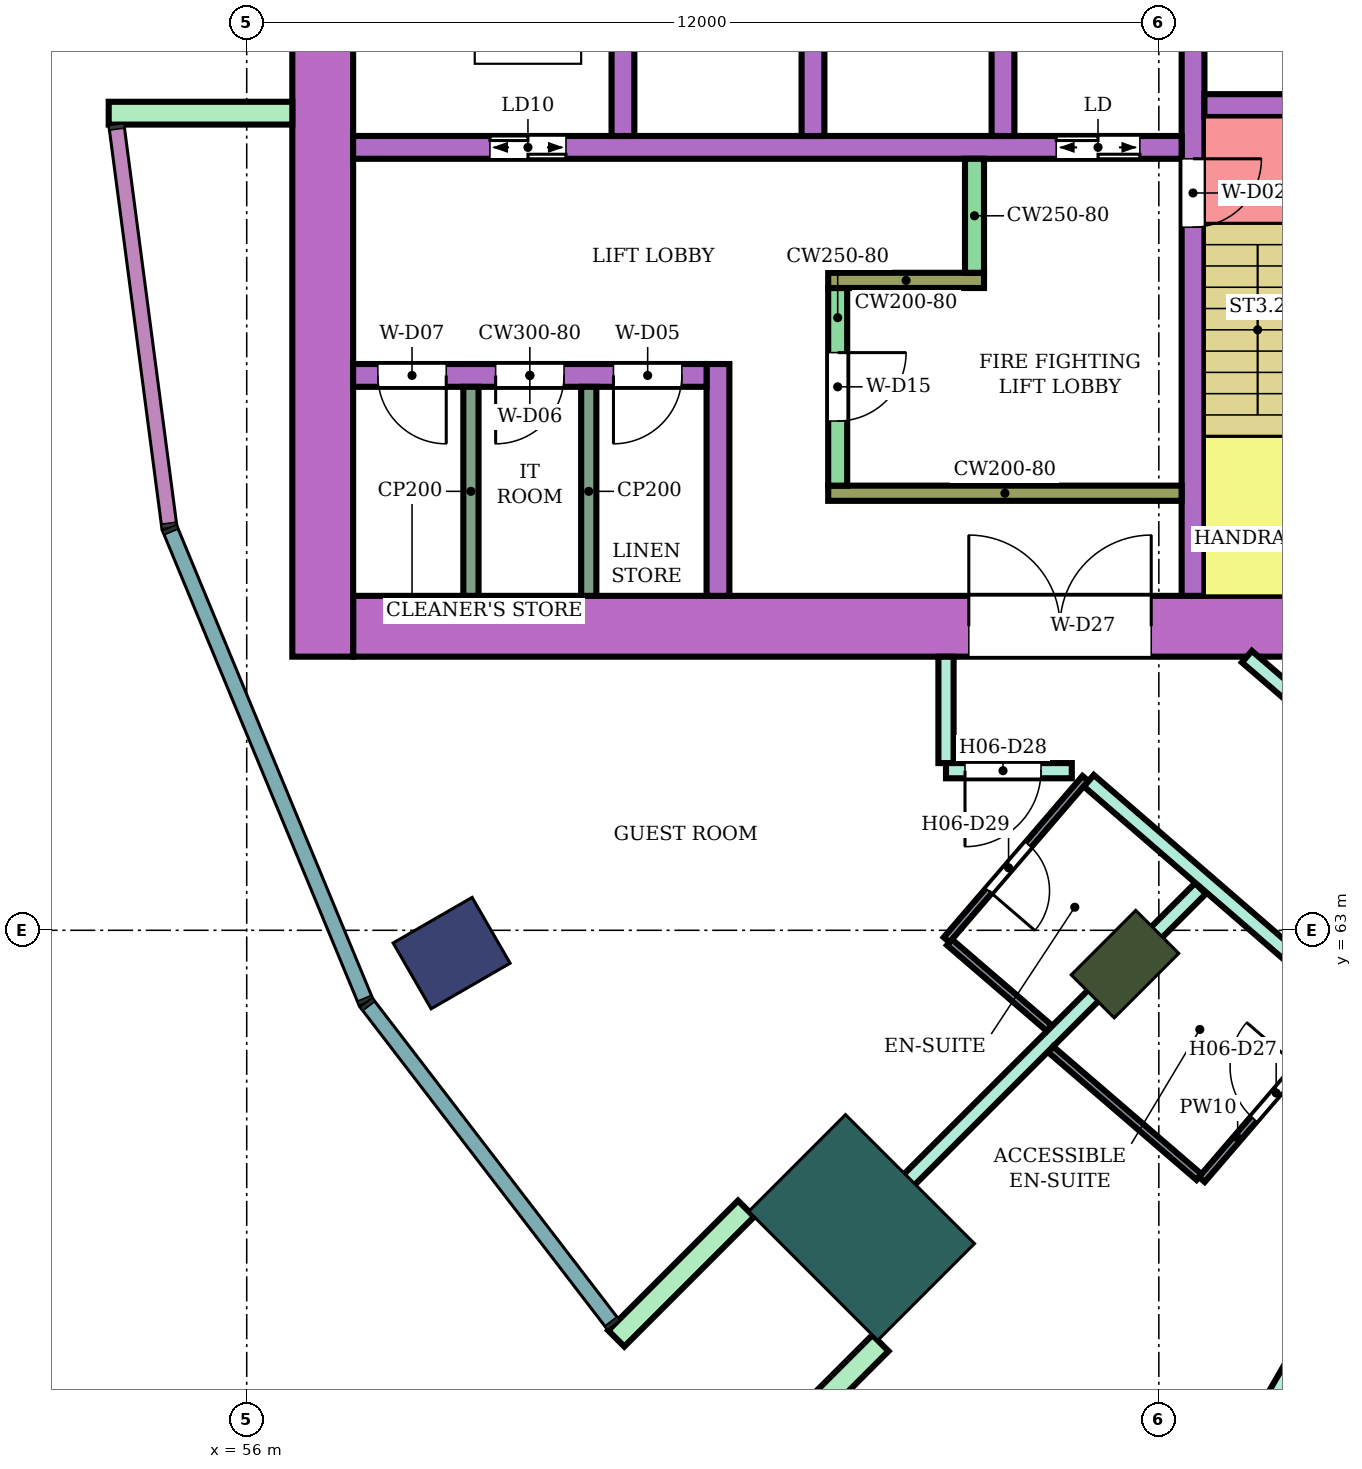
"""IFC4 building model, lengths in metres.
Left out: names, types, materials, properties, quantities, classifications, styles, units other than length and angle.
Written with IfcOpenShell. Run it as: python <this file> out.ifc"""

import sys

from ifc_helpers import new_model, si_unit, direction, frame, frame_2d, origin, origin_2d, place, context, subcontext, project, spatial, rectangle, extrude, element, fill, save


model = new_model("IFC4")
c1 = context("Model", 3, precision=1e-05, world=origin(), true_north=direction((0.0, 1.0)))
c2 = subcontext(c1, "Body", "Model", "MODEL_VIEW")
j1 = project(units=[si_unit("LENGTHUNIT", "METRE"), si_unit("PLANEANGLEUNIT", "RADIAN")], contexts=[c1])
p1 = place(None, origin())
s1 = spatial("IfcSite", under=j1, at=p1, CompositionType="ELEMENT")
p2 = place(p1, origin())
s2 = spatial("IfcBuilding", under=s1, at=p2, CompositionType="ELEMENT")
p3 = place(p2, frame((0.0, 0.0, 97.6)))
s3 = spatial("IfcBuildingStorey", under=s2, at=p3, CompositionType="ELEMENT", Elevation=97.6)
p4 = place(p3, frame((58.696, 62.7, 0.0), z_axis=(0.0, 0.0, 1.0), x_axis=(-0.866025403784, -0.5, 0.0)))
e1 = element("IfcColumn", 1, at=p4, inside=s3, PredefinedType="COLUMN", context=c2, shape_type="SweptSolid", body=[
    extrude(rectangle(XDim=1.2, YDim=1.0, at=origin_2d()), origin(), (0.0, 0.0, 1.0), 3.8),
])
p5 = place(p3, frame((67.555, 62.555, 0.0), z_axis=(0.0, 0.0, 1.0), x_axis=(-0.707106781187, -0.707106781187, 0.0)))
e2 = element("IfcColumn", 2, at=p5, inside=s3, PredefinedType="COLUMN", context=c2, shape_type="SweptSolid", body=[
    extrude(rectangle(XDim=1.2, YDim=0.8, at=origin_2d()), origin(), (0.0, 0.0, 1.0), 3.8),
])
p6 = place(p3, frame((64.09, 59.09, 0.0), z_axis=(0.0, 0.0, 1.0), x_axis=(-0.707106781187, -0.707106781187, 0.0)))
e3 = element("IfcColumn", 3, at=p6, inside=s3, PredefinedType="COLUMN", context=c2, shape_type="SweptSolid", body=[
    extrude(rectangle(XDim=1.8, YDim=2.4, at=origin_2d()), origin(), (0.0, 0.0, 1.0), 3.8),
])
p7 = place(p3, frame((72.1, 67.0, 0.0), z_axis=(0.0, 0.0, 1.0), x_axis=(-1.0, 0.0, 0.0)))
e4 = element("IfcWall", 4, at=p7, inside=s3, PredefinedType="SHEAR", context=c2, shape_type="SweptSolid", body=[
    extrude(rectangle(XDim=14.7, YDim=0.8, at=frame_2d((7.35, 0.0))), origin(), (0.0, 0.0, 1.0), 3.48),
])
p8 = place(p7, frame((4.2, 0.0, 0.0)))
e5 = element("IfcOpeningElement", 5, at=p8, cuts=e4, PredefinedType="OPENING", context=c2, shape_type="SweptSolid", body=[
    extrude(rectangle(XDim=2.4, YDim=2.4, at=frame_2d((1.2, 1.2))), frame((0.0, 0.41, 0.0), z_axis=(0.0, -1.0, 0.0), x_axis=(1.0, 0.0, 0.0)), (0.0, 0.0, 1.0), 0.82),
])
p9 = place(p3, frame((57.0, 83.4, 0.0), z_axis=(0.0, 0.0, 1.0), x_axis=(0.0, -1.0, 0.0)))
e6 = element("IfcWall", 6, at=p9, inside=s3, PredefinedType="SHEAR", context=c2, shape_type="SweptSolid", body=[
    extrude(rectangle(XDim=16.8, YDim=0.8, at=frame_2d((8.4, 0.0))), origin(), (0.0, 0.0, 1.0), 3.48),
])
p10 = place(p3, frame((68.45, 75.0, 0.0), z_axis=(0.0, 0.0, 1.0), x_axis=(0.0, -1.0, 0.0)))
e7 = element("IfcWall", 7, at=p10, inside=s3, PredefinedType="SHEAR", context=c2, shape_type="SweptSolid", body=[
    extrude(rectangle(XDim=7.6, YDim=0.3, at=frame_2d((3.8, 0.0))), origin(), (0.0, 0.0, 1.0), 3.48),
])
p11 = place(p10, frame((1.85, 0.0, 0.0)))
e8 = element("IfcOpeningElement", 8, at=p11, cuts=e7, PredefinedType="OPENING", context=c2, shape_type="SweptSolid", body=[
    extrude(rectangle(XDim=0.9, YDim=2.1, at=frame_2d((0.45, 1.05))), frame((0.0, 0.16, 0.0), z_axis=(0.0, -1.0, 0.0), x_axis=(1.0, 0.0, 0.0)), (0.0, 0.0, 1.0), 0.32),
])
p12 = place(p3, frame((71.65, 73.85, 0.0), z_axis=(0.0, 0.0, 1.0), x_axis=(-1.0, 0.0, 0.0)))
e9 = element("IfcWall", 9, at=p12, inside=s3, PredefinedType="SHEAR", context=c2, shape_type="SweptSolid", body=[
    extrude(rectangle(XDim=3.05, YDim=0.3, at=frame_2d((1.525, 0.0))), origin(), (0.0, 0.0, 1.0), 3.48),
])
p13 = place(p12, frame((1.1, 0.0, 0.0)))
e10 = element("IfcOpeningElement", 10, at=p13, cuts=e9, PredefinedType="OPENING", context=c2, shape_type="SweptSolid", body=[
    extrude(rectangle(XDim=0.7, YDim=2.0, at=frame_2d((0.35, 1.0))), frame((0.0, 0.16, 0.0), z_axis=(0.0, -1.0, 0.0), x_axis=(1.0, 0.0, 0.0)), (0.0, 0.0, 1.0), 0.32),
])
p14 = place(p3, frame((68.3, 73.3, 0.0), z_axis=(0.0, 0.0, 1.0), x_axis=(-1.0, 0.0, 0.0)))
e11 = element("IfcWall", 11, at=p14, inside=s3, PredefinedType="SHEAR", context=c2, shape_type="SweptSolid", body=[
    extrude(rectangle(XDim=10.9, YDim=0.3, at=frame_2d((5.45, 0.0))), origin(), (0.0, 0.0, 1.0), 3.48),
])
p15 = place(p14, frame((0.55, 0.0, 0.0)))
e12 = element("IfcOpeningElement", 12, at=p15, cuts=e11, PredefinedType="OPENING", context=c2, shape_type="SweptSolid", body=[
    extrude(rectangle(XDim=1.1, YDim=2.1, at=frame_2d((0.55, 1.05))), frame((0.0, 0.16, 0.0), z_axis=(0.0, -1.0, 0.0), x_axis=(1.0, 0.0, 0.0)), (0.0, 0.0, 1.0), 0.32),
])
p16 = place(p14, frame((8.1, 0.0, 0.0)))
e13 = element("IfcOpeningElement", 13, at=p16, cuts=e11, PredefinedType="OPENING", context=c2, shape_type="SweptSolid", body=[
    extrude(rectangle(XDim=1.0, YDim=2.1, at=frame_2d((0.5, 1.05))), frame((0.0, 0.16, 0.0), z_axis=(0.0, -1.0, 0.0), x_axis=(1.0, 0.0, 0.0)), (0.0, 0.0, 1.0), 0.32),
])
for number, where, z_axis, x_axis in (
    (14, (65.95, 76.0, 0.0), (0.0, 0.0, 1.0), (0.0, -1.0, 0.0)),
    (15, (63.45, 76.0, 0.0), (0.0, 0.0, 1.0), (0.0, -1.0, 0.0)),
    (16, (60.95, 76.0, 0.0), (0.0, 0.0, 1.0), (0.0, -1.0, 0.0)),
):
    element("IfcWall", number, at=place(p3, frame(where, z_axis=z_axis, x_axis=x_axis)), inside=s3, PredefinedType="SHEAR", context=c2, shape_type="SweptSolid", body=[
        extrude(rectangle(XDim=2.55, YDim=0.3, at=frame_2d((1.275, 0.0))), origin(), (0.0, 0.0, 1.0), 3.48),
    ])
p17 = place(p3, frame((68.3, 68.75, 0.0), z_axis=(0.0, 0.0, 1.0), x_axis=(-1.0, 0.0, 0.0)))
e17 = element("IfcWall", 17, at=p17, inside=s3, PredefinedType="SHEAR", context=c2, shape_type="SweptSolid", body=[
    extrude(rectangle(XDim=4.65, YDim=0.2, at=frame_2d((2.325, 0.0))), origin(), (0.0, 0.0, 1.0), 3.48),
])
p18 = place(p3, frame((63.775, 71.45, 0.0), z_axis=(0.0, 0.0, 1.0), x_axis=(0.0, -1.0, 0.0)))
e18 = element("IfcWall", 18, at=p18, inside=s3, PredefinedType="SHEAR", context=c2, shape_type="SweptSolid", body=[
    extrude(rectangle(XDim=2.6, YDim=0.25, at=frame_2d((1.3, 0.0))), origin(), (0.0, 0.0, 1.0), 3.48),
])
p19 = place(p18, frame((0.85, 0.0, 0.0)))
e19 = element("IfcOpeningElement", 19, at=p19, cuts=e18, PredefinedType="OPENING", context=c2, shape_type="SweptSolid", body=[
    extrude(rectangle(XDim=0.9, YDim=2.1, at=frame_2d((0.45, 1.05))), frame((0.0, 0.135, 0.0), z_axis=(0.0, -1.0, 0.0), x_axis=(1.0, 0.0, 0.0)), (0.0, 0.0, 1.0), 0.27),
])
p20 = place(p3, frame((65.7, 71.55, 0.0), z_axis=(0.0, 0.0, 1.0), x_axis=(-1.0, 0.0, 0.0)))
e20 = element("IfcWall", 20, at=p20, inside=s3, PredefinedType="SHEAR", context=c2, shape_type="SweptSolid", body=[
    extrude(rectangle(XDim=2.05, YDim=0.2, at=frame_2d((1.025, 0.0))), origin(), (0.0, 0.0, 1.0), 3.48),
])
p21 = place(p3, frame((65.575, 73.15, 0.0), z_axis=(0.0, 0.0, 1.0), x_axis=(0.0, -1.0, 0.0)))
e21 = element("IfcWall", 21, at=p21, inside=s3, PredefinedType="SHEAR", context=c2, shape_type="SweptSolid", body=[
    extrude(rectangle(XDim=1.5, YDim=0.25, at=frame_2d((0.75, 0.0))), origin(), (0.0, 0.0, 1.0), 3.48),
])
p22 = place(p3, frame((62.2, 70.45, 0.0), z_axis=(0.0, 0.0, 1.0), x_axis=(0.0, -1.0, 0.0)))
e22 = element("IfcWall", 22, at=p22, inside=s3, PredefinedType="SHEAR", context=c2, shape_type="SweptSolid", body=[
    extrude(rectangle(XDim=3.05, YDim=0.3, at=frame_2d((1.525, 0.0))), origin(), (0.0, 0.0, 1.0), 3.48),
])
p23 = place(p3, frame((62.05, 70.3, 0.0), z_axis=(0.0, 0.0, 1.0), x_axis=(-1.0, 0.0, 0.0)))
e23 = element("IfcWall", 23, at=p23, inside=s3, PredefinedType="SHEAR", context=c2, shape_type="SweptSolid", body=[
    extrude(rectangle(XDim=4.65, YDim=0.3, at=frame_2d((2.325, 0.0))), origin(), (0.0, 0.0, 1.0), 3.48),
])
p24 = place(p23, frame((0.325, 0.0, 0.0)))
e24 = element("IfcOpeningElement", 24, at=p24, cuts=e23, PredefinedType="OPENING", context=c2, shape_type="SweptSolid", body=[
    extrude(rectangle(XDim=0.9, YDim=2.1, at=frame_2d((0.45, 1.05))), frame((0.0, 0.16, 0.0), z_axis=(0.0, -1.0, 0.0), x_axis=(1.0, 0.0, 0.0)), (0.0, 0.0, 1.0), 0.32),
])
p25 = place(p23, frame((1.875, 0.0, 0.0)))
e25 = element("IfcOpeningElement", 25, at=p25, cuts=e23, PredefinedType="OPENING", context=c2, shape_type="SweptSolid", body=[
    extrude(rectangle(XDim=0.9, YDim=2.1, at=frame_2d((0.45, 1.05))), frame((0.0, 0.16, 0.0), z_axis=(0.0, -1.0, 0.0), x_axis=(1.0, 0.0, 0.0)), (0.0, 0.0, 1.0), 0.32),
])
p26 = place(p23, frame((3.425, 0.0, 0.0)))
e26 = element("IfcOpeningElement", 26, at=p26, cuts=e23, PredefinedType="OPENING", context=c2, shape_type="SweptSolid", body=[
    extrude(rectangle(XDim=0.9, YDim=2.1, at=frame_2d((0.45, 1.05))), frame((0.0, 0.16, 0.0), z_axis=(0.0, -1.0, 0.0), x_axis=(1.0, 0.0, 0.0)), (0.0, 0.0, 1.0), 0.32),
])
for number, where, z_axis, x_axis in (
    (27, (56.6, 73.75, 0.0), (0.0, 0.0, 1.0), (-1.0, 0.0, 0.0)),
    (28, (62.57, 59.338, 0.0), (0.0, 0.0, 1.0), (-0.707, -0.707, 0.0)),
    (29, (64.338, 57.57, 0.0), (0.0, 0.0, 1.0), (-0.707, -0.707, 0.0)),
):
    element("IfcWall", number, at=place(p3, frame(where, z_axis=z_axis, x_axis=x_axis)), inside=s3, PredefinedType="NOTDEFINED", context=c2, shape_type="SweptSolid", body=[
        extrude(rectangle(XDim=2.416, YDim=0.3, at=frame_2d((1.208, 0.0))), origin(), (0.0, 0.0, 1.0), 3.8),
    ])
p27 = place(p3, frame((63.594, 58.598, 0.0), z_axis=(0.0, 0.0, 1.0), x_axis=(0.707228748718, 0.706984792613, 0.0)))
e30 = element("IfcWall", 30, at=p27, inside=s3, PredefinedType="PARTITIONING", context=c2, shape_type="SweptSolid", body=[
    extrude(rectangle(XDim=7.005, YDim=0.2, at=frame_2d((3.503, 0.0))), origin(), (0.0, 0.0, 1.0), 3.35),
])
p28 = place(p3, frame((65.2, 65.2, 0.0), z_axis=(0.0, 0.0, 1.0), x_axis=(0.0, 1.0, 0.0)))
e31 = element("IfcWall", 31, at=p28, inside=s3, PredefinedType="PARTITIONING", context=c2, shape_type="SweptSolid", body=[
    extrude(rectangle(XDim=1.399, YDim=0.2, at=frame_2d((0.7, 0.0))), origin(), (0.0, 0.0, 1.0), 3.35),
])
p29 = place(p3, frame((65.2, 65.1, 0.0), z_axis=(0.0, 0.0, 1.0), x_axis=(1.0, 0.0, 0.0)))
e32 = element("IfcWall", 32, at=p29, inside=s3, PredefinedType="PARTITIONING", context=c2, shape_type="SweptSolid", body=[
    extrude(rectangle(XDim=1.655, YDim=0.2, at=frame_2d((0.828, 0.0))), origin(), (0.0, 0.0, 1.0), 3.35),
])
p30 = place(p29, frame((0.25, 0.0, 0.0)))
e33 = element("IfcOpeningElement", 33, at=p30, cuts=e32, PredefinedType="OPENING", context=c2, shape_type="SweptSolid", body=[
    extrude(rectangle(XDim=1.0, YDim=2.1, at=frame_2d((0.5, 1.05))), frame((0.0, 0.11, 0.0), z_axis=(0.0, -1.0, 0.0), x_axis=(1.0, 0.0, 0.0)), (0.0, 0.0, 1.0), 0.22),
])
p31 = place(p3, frame((67.079, 64.968, 0.0), z_axis=(0.0, 0.0, 1.0), x_axis=(0.756371089567, -0.654142778656, 0.0)))
e34 = element("IfcWall", 34, at=p31, inside=s3, PredefinedType="PARTITIONING", context=c2, shape_type="SweptSolid", body=[
    extrude(rectangle(XDim=6.185, YDim=0.2, at=frame_2d((3.093, 0.0))), origin(), (0.0, 0.0, 1.0), 3.35),
])
p32 = place(p31, frame((4.778, 0.0, 0.0)))
e35 = element("IfcOpeningElement", 35, at=p32, cuts=e34, PredefinedType="OPENING", context=c2, shape_type="SweptSolid", body=[
    extrude(rectangle(XDim=1.1, YDim=2.1, at=frame_2d((0.55, 1.05))), frame((0.0, 0.11, 0.0), z_axis=(0.0, -1.0, 0.0), x_axis=(1.0, 0.0, 0.0)), (0.0, 0.0, 1.0), 0.22),
])
p33 = place(p3, frame((67.096, 52.662, 0.0), z_axis=(0.0, 0.0, 1.0), x_axis=(0.500222922337, 0.865896661253, 0.0)))
e36 = element("IfcWall", 36, at=p33, inside=s3, PredefinedType="PARTITIONING", context=c2, shape_type="SweptSolid", body=[
    extrude(rectangle(XDim=9.374, YDim=0.2, at=frame_2d((4.687, 0.0))), origin(), (0.0, 0.0, 1.0), 3.35),
])
p34 = place(p3, frame((69.158, 66.6, 0.0), z_axis=(0.0, 0.0, 1.0), x_axis=(0.757976058094, -0.652282373943, 0.0)))
e37 = element("IfcWall", 37, at=p34, inside=s3, PredefinedType="PARTITIONING", context=c2, shape_type="SweptSolid", body=[
    extrude(rectangle(XDim=5.16, YDim=0.2, at=frame_2d((2.58, 0.0))), origin(), (0.0, 0.0, 1.0), 3.35),
])
p35 = place(p34, frame((1.6, 0.0, 0.0)))
e38 = element("IfcOpeningElement", 38, at=p35, cuts=e37, PredefinedType="OPENING", context=c2, shape_type="SweptSolid", body=[
    extrude(rectangle(XDim=1.0, YDim=2.1, at=frame_2d((0.5, 1.05))), frame((0.0, 0.11, 0.0), z_axis=(0.0, -1.0, 0.0), x_axis=(1.0, 0.0, 0.0)), (0.0, 0.0, 1.0), 0.22),
])
p36 = place(p3, frame((65.246, 62.842, 0.0), z_axis=(0.0, 0.0, 1.0), x_axis=(0.758030338995, -0.652219292234, 0.0)))
e39 = element("IfcWall", 39, at=p36, inside=s3, PredefinedType="PARTITIONING", context=c2, shape_type="SweptSolid", body=[
    extrude(rectangle(XDim=1.73, YDim=0.1, at=frame_2d((0.865, 0.0))), origin(), (0.0, 0.0, 1.0), 3.35),
])
p37 = place(p3, frame((65.208, 62.875, 0.0), z_axis=(0.0, 0.0, 1.0), x_axis=(0.65205430601, 0.758172264076, 0.0)))
e40 = element("IfcWall", 40, at=p37, inside=s3, PredefinedType="PARTITIONING", context=c2, shape_type="SweptSolid", body=[
    extrude(rectangle(XDim=2.8, YDim=0.1, at=frame_2d((1.4, 0.0))), origin(), (0.0, 0.0, 1.0), 3.35),
])
p38 = place(p37, frame((0.85, 0.0, 0.0)))
e41 = element("IfcOpeningElement", 41, at=p38, cuts=e40, PredefinedType="OPENING", context=c2, shape_type="SweptSolid", body=[
    extrude(rectangle(XDim=0.8, YDim=2.1, at=frame_2d((0.4, 1.05))), frame((0.0, 0.06, 0.0), z_axis=(0.0, -1.0, 0.0), x_axis=(1.0, 0.0, 0.0)), (0.0, 0.0, 1.0), 0.12),
])
p39 = place(p3, frame((66.576, 61.435, 0.0), z_axis=(0.0, 0.0, 1.0), x_axis=(0.757970550281, -0.652288774169, 0.0)))
e42 = element("IfcWall", 42, at=p39, inside=s3, PredefinedType="PARTITIONING", context=c2, shape_type="SweptSolid", body=[
    extrude(rectangle(XDim=2.576, YDim=0.1, at=frame_2d((1.288, 0.0))), origin(), (0.0, 0.0, 1.0), 3.35),
])
p40 = place(p3, frame((68.566, 59.722, 0.0), z_axis=(0.0, 0.0, 1.0), x_axis=(0.65193146671, 0.758277892803, 0.0)))
e43 = element("IfcWall", 43, at=p40, inside=s3, PredefinedType="PARTITIONING", context=c2, shape_type="SweptSolid", body=[
    extrude(rectangle(XDim=2.89, YDim=0.1, at=frame_2d((1.445, 0.0))), origin(), (0.0, 0.0, 1.0), 3.35),
])
p41 = place(p40, frame((1.05, 0.0, 0.0)))
e44 = element("IfcOpeningElement", 44, at=p41, cuts=e43, PredefinedType="OPENING", context=c2, shape_type="SweptSolid", body=[
    extrude(rectangle(XDim=0.9, YDim=2.1, at=frame_2d((0.45, 1.05))), frame((0.0, 0.06, 0.0), z_axis=(0.0, -1.0, 0.0), x_axis=(1.0, 0.0, 0.0)), (0.0, 0.0, 1.0), 0.12),
])
for number, where, z_axis, x_axis in (
    (45, (60.5, 70.15, 0.0), (0.0, 0.0, 1.0), (0.0, -1.0, 0.0)),
    (46, (58.95, 70.15, 0.0), (0.0, 0.0, 1.0), (0.0, -1.0, 0.0)),
):
    element("IfcWall", number, at=place(p3, frame(where, z_axis=z_axis, x_axis=x_axis)), inside=s3, PredefinedType="PARTITIONING", context=c2, shape_type="SweptSolid", body=[
        extrude(rectangle(XDim=2.75, YDim=0.2, at=frame_2d((1.375, 0.0))), origin(), (0.0, 0.0, 1.0), 3.48),
    ])
p42 = place(p41, origin())
e47 = element("IfcDoor", 47, at=p42, inside=s3, OperationType="SINGLE_SWING_RIGHT", PredefinedType="DOOR", context=c2, shape_type="SweptSolid", body=[
    extrude(rectangle(XDim=0.9, YDim=2.1, at=frame_2d((0.45, 1.05))), frame((0.0, 0.025, 0.0), z_axis=(0.0, -1.0, 0.0), x_axis=(1.0, 0.0, 0.0)), (0.0, 0.0, 1.0), 0.05),
])
fill(e44, e47)
p43 = place(p30, frame((1.0, 0.0, 0.0), z_axis=(0.0, 0.0, 1.0), x_axis=(-1.0, 0.0, 0.0)))
e48 = element("IfcDoor", 48, at=p43, inside=s3, OperationType="SINGLE_SWING_RIGHT", PredefinedType="DOOR", context=c2, shape_type="SweptSolid", body=[
    extrude(rectangle(XDim=1.0, YDim=2.1, at=frame_2d((0.5, 1.05))), frame((0.0, 0.025, 0.0), z_axis=(0.0, -1.0, 0.0), x_axis=(1.0, 0.0, 0.0)), (0.0, 0.0, 1.0), 0.05),
])
fill(e33, e48)
p44 = place(p38, frame((0.8, 0.0, 0.0), z_axis=(0.0, 0.0, 1.0), x_axis=(-1.0, 0.0, 0.0)))
e49 = element("IfcDoor", 49, at=p44, inside=s3, OperationType="SINGLE_SWING_RIGHT", PredefinedType="DOOR", context=c2, shape_type="SweptSolid", body=[
    extrude(rectangle(XDim=0.8, YDim=2.1, at=frame_2d((0.4, 1.05))), frame((0.0, 0.025, 0.0), z_axis=(0.0, -1.0, 0.0), x_axis=(1.0, 0.0, 0.0)), (0.0, 0.0, 1.0), 0.05),
])
fill(e41, e49)
p45 = place(p11, origin())
e50 = element("IfcDoor", 50, at=p45, inside=s3, OperationType="SINGLE_SWING_LEFT", PredefinedType="DOOR", context=c2, shape_type="SweptSolid", body=[
    extrude(rectangle(XDim=0.9, YDim=2.1, at=frame_2d((0.45, 1.05))), frame((0.0, 0.025, 0.0), z_axis=(0.0, -1.0, 0.0), x_axis=(1.0, 0.0, 0.0)), (0.0, 0.0, 1.0), 0.05),
])
fill(e8, e50)
p46 = place(p15, origin())
e51 = element("IfcDoor", 51, at=p46, inside=s3, OperationType="DOUBLE_DOOR_SLIDING", PredefinedType="DOOR", context=c2, shape_type="SweptSolid", body=[
    extrude(rectangle(XDim=1.1, YDim=2.1, at=frame_2d((0.55, 1.05))), frame((0.0, 0.025, 0.0), z_axis=(0.0, -1.0, 0.0), x_axis=(1.0, 0.0, 0.0)), (0.0, 0.0, 1.0), 0.05),
])
fill(e12, e51)
p47 = place(p16, origin())
e52 = element("IfcDoor", 52, at=p47, inside=s3, OperationType="DOUBLE_DOOR_SLIDING", PredefinedType="DOOR", context=c2, shape_type="SweptSolid", body=[
    extrude(rectangle(XDim=1.0, YDim=2.1, at=frame_2d((0.5, 1.05))), frame((0.0, 0.025, 0.0), z_axis=(0.0, -1.0, 0.0), x_axis=(1.0, 0.0, 0.0)), (0.0, 0.0, 1.0), 0.05),
])
fill(e13, e52)
p48 = place(p19, origin())
e53 = element("IfcDoor", 53, at=p48, inside=s3, OperationType="SINGLE_SWING_LEFT", PredefinedType="DOOR", context=c2, shape_type="SweptSolid", body=[
    extrude(rectangle(XDim=0.9, YDim=2.1, at=frame_2d((0.45, 1.05))), frame((0.0, 0.025, 0.0), z_axis=(0.0, -1.0, 0.0), x_axis=(1.0, 0.0, 0.0)), (0.0, 0.0, 1.0), 0.05),
])
fill(e19, e53)
p49 = place(p24, origin())
e54 = element("IfcDoor", 54, at=p49, inside=s3, OperationType="SINGLE_SWING_RIGHT", PredefinedType="DOOR", context=c2, shape_type="SweptSolid", body=[
    extrude(rectangle(XDim=0.9, YDim=2.1, at=frame_2d((0.45, 1.05))), frame((0.0, 0.025, 0.0), z_axis=(0.0, -1.0, 0.0), x_axis=(1.0, 0.0, 0.0)), (0.0, 0.0, 1.0), 0.05),
])
fill(e24, e54)
p50 = place(p25, origin())
e55 = element("IfcDoor", 55, at=p50, inside=s3, OperationType="SINGLE_SWING_RIGHT", PredefinedType="DOOR", context=c2, shape_type="SweptSolid", body=[
    extrude(rectangle(XDim=0.9, YDim=2.1, at=frame_2d((0.45, 1.05))), frame((0.0, 0.025, 0.0), z_axis=(0.0, -1.0, 0.0), x_axis=(1.0, 0.0, 0.0)), (0.0, 0.0, 1.0), 0.05),
])
fill(e25, e55)
p51 = place(p26, origin())
e56 = element("IfcDoor", 56, at=p51, inside=s3, OperationType="SINGLE_SWING_LEFT", PredefinedType="DOOR", context=c2, shape_type="SweptSolid", body=[
    extrude(rectangle(XDim=0.9, YDim=2.1, at=frame_2d((0.45, 1.05))), frame((0.0, 0.025, 0.0), z_axis=(0.0, -1.0, 0.0), x_axis=(1.0, 0.0, 0.0)), (0.0, 0.0, 1.0), 0.05),
])
fill(e26, e56)
p52 = place(p8, frame((2.4, 0.0, 0.0), z_axis=(0.0, 0.0, 1.0), x_axis=(-1.0, 0.0, 0.0)))
e57 = element("IfcDoor", 57, at=p52, inside=s3, OperationType="DOUBLE_DOOR_SINGLE_SWING", PredefinedType="DOOR", context=c2, shape_type="SweptSolid", body=[
    extrude(rectangle(XDim=2.4, YDim=2.4, at=frame_2d((1.2, 1.2))), frame((0.0, 0.025, 0.0), z_axis=(0.0, -1.0, 0.0), x_axis=(1.0, 0.0, 0.0)), (0.0, 0.0, 1.0), 0.05),
])
fill(e5, e57)
save(model, sys.argv[1])
